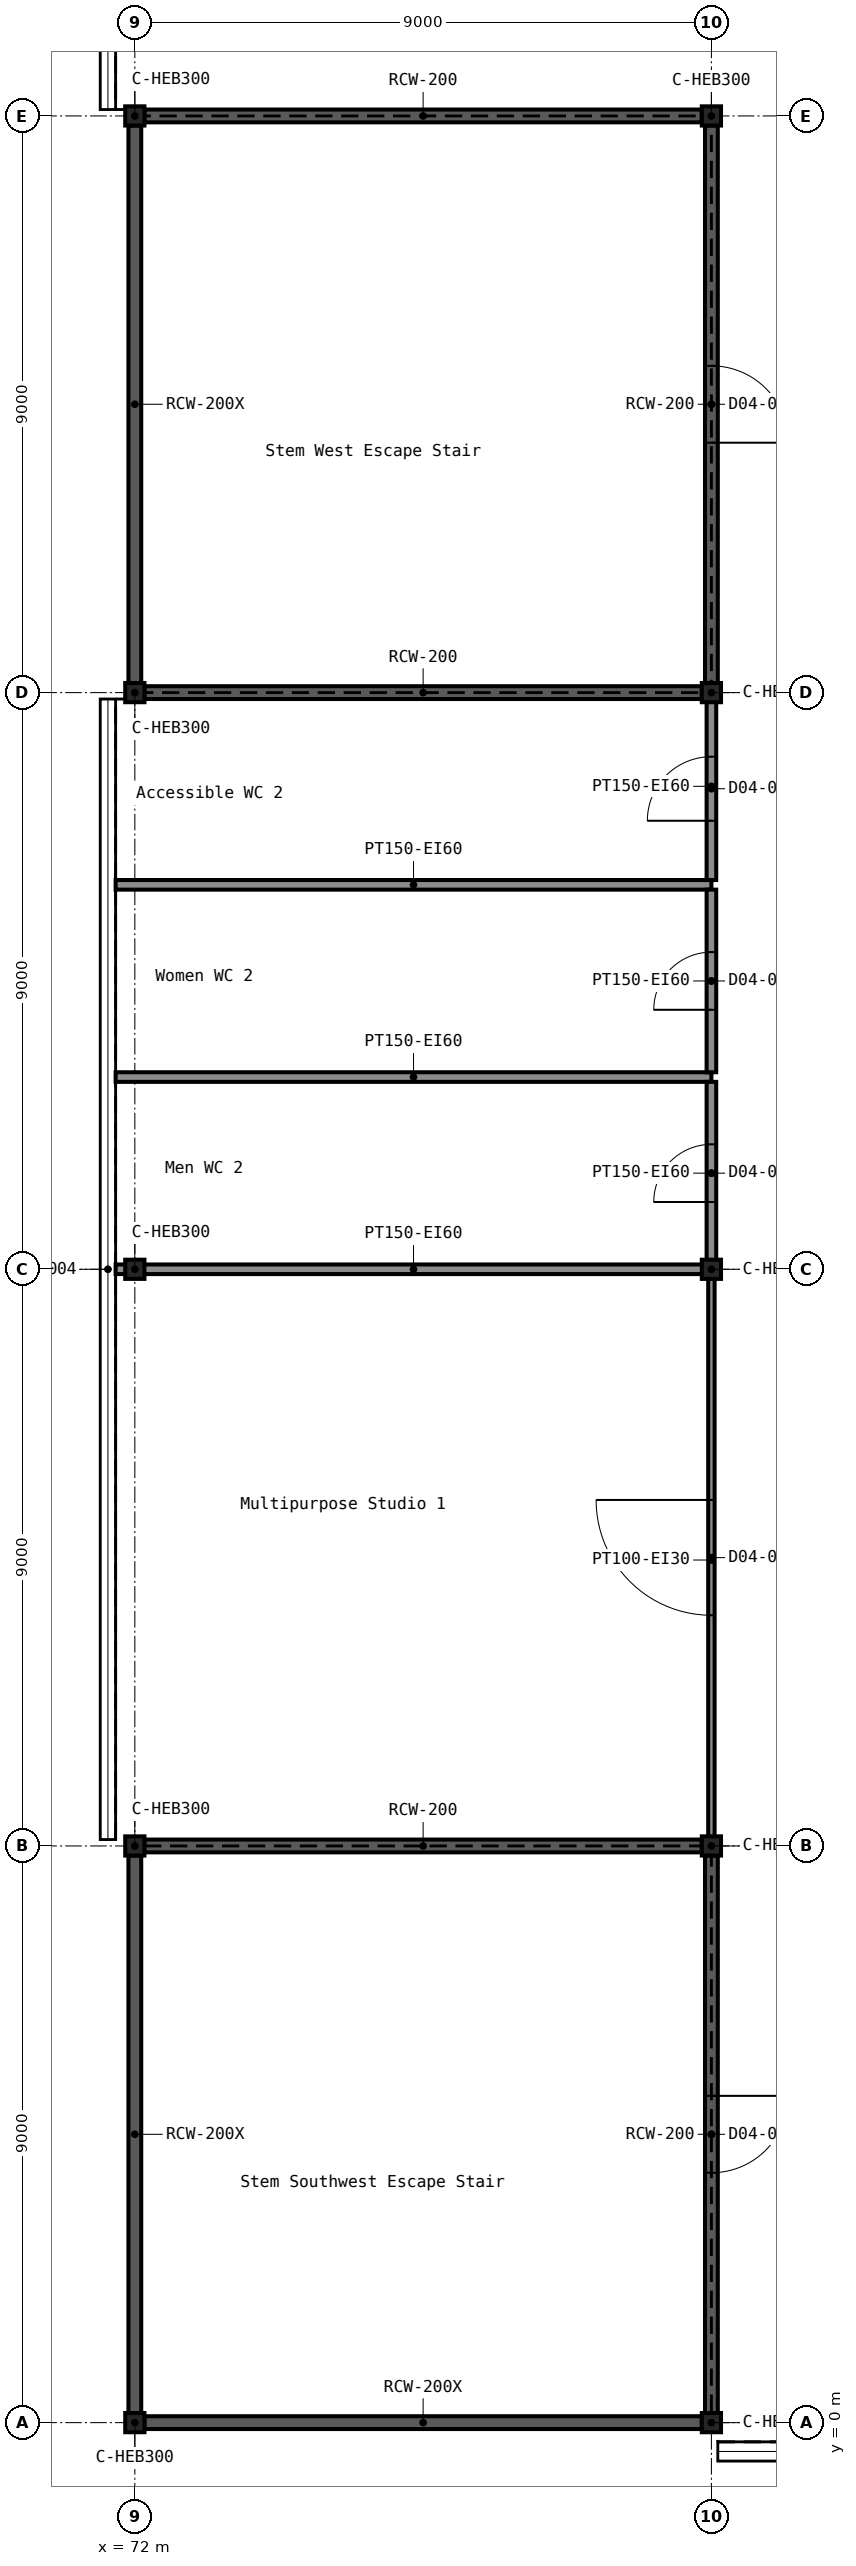
"""IFC4 building model, lengths in metres.
Left out: names, types, materials, properties, quantities, classifications, styles, units other than length and angle.
Written with IfcOpenShell. Run it as: python <this file> out.ifc"""

import sys

from ifc_helpers import new_model, si_unit, direction, frame, frame_2d, origin, origin_2d, place, context, subcontext, project, spatial, rectangle, i_section, extrude, element, fill, save


model = new_model("IFC4")
c1 = context("Model", 3, precision=1e-05, world=origin(), true_north=direction((0.0, 1.0)))
c2 = subcontext(c1, "Body", "Model", "MODEL_VIEW")
j1 = project(units=[si_unit("LENGTHUNIT", "METRE"), si_unit("PLANEANGLEUNIT", "RADIAN")], contexts=[c1])
p1 = place(None, origin())
s1 = spatial("IfcSite", under=j1, at=p1, CompositionType="ELEMENT")
p2 = place(p1, origin())
s2 = spatial("IfcBuilding", under=s1, at=p2, CompositionType="ELEMENT")
p3 = place(p2, frame((0.0, 0.0, 21.6)))
s3 = spatial("IfcBuildingStorey", under=s2, at=p3, CompositionType="ELEMENT", Elevation=21.6)
for number, where, z_axis, x_axis in (
    (1, (72.0, 0.0, 0.0), (0.0, 0.0, 1.0), (0.0, 1.0, 0.0)),
    (2, (81.0, 0.0, 0.0), (0.0, 0.0, 1.0), (0.0, 1.0, 0.0)),
    (3, (72.0, 9.0, 0.0), (0.0, 0.0, 1.0), (0.0, 1.0, 0.0)),
    (4, (81.0, 9.0, 0.0), (0.0, 0.0, 1.0), (1.0, 0.0, 0.0)),
    (5, (72.0, 18.0, 0.0), (0.0, 0.0, 1.0), (0.0, 1.0, 0.0)),
    (6, (81.0, 18.0, 0.0), (0.0, 0.0, 1.0), (1.0, 0.0, 0.0)),
    (7, (72.0, 27.0, 0.0), (0.0, 0.0, 1.0), (0.0, 1.0, 0.0)),
    (8, (81.0, 27.0, 0.0), (0.0, 0.0, 1.0), (1.0, 0.0, 0.0)),
    (9, (72.0, 36.0, 0.0), (0.0, 0.0, 1.0), (0.0, 1.0, 0.0)),
    (10, (81.0, 36.0, 0.0), (0.0, 0.0, 1.0), (1.0, 0.0, 0.0)),
):
    element("IfcColumn", number, at=place(p3, frame(where, z_axis=z_axis, x_axis=x_axis)), inside=s3, PredefinedType="COLUMN", context=c2, shape_type="SweptSolid", body=[
        extrude(i_section(OverallWidth=0.3, OverallDepth=0.3, WebThickness=0.011, FlangeThickness=0.019, FilletRadius=0.027, at=origin_2d()), origin(), (0.0, 0.0, 1.0), 5.4),
    ])
for number, where, z_axis, x_axis in (
    (11, (72.15, 0.0, 0.0), (0.0, 0.0, 1.0), (1.0, 0.0, 0.0)),
    (12, (72.15, 9.0, 0.0), (0.0, 0.0, 1.0), (1.0, 0.0, 0.0)),
    (13, (72.0, 0.15, 0.0), (0.0, 0.0, 1.0), (0.0, 1.0, 0.0)),
):
    element("IfcWall", number, at=place(p3, frame(where, z_axis=z_axis, x_axis=x_axis)), inside=s3, PredefinedType="SHEAR", context=c2, shape_type="SweptSolid", body=[
        extrude(rectangle(XDim=8.7, YDim=0.2, at=frame_2d((4.35, 0.0))), origin(), (0.0, 0.0, 1.0), 5.4),
    ])
p4 = place(p3, frame((81.0, 0.15, 0.0), z_axis=(0.0, 0.0, 1.0), x_axis=(0.0, 1.0, 0.0)))
e14 = element("IfcWall", 14, at=p4, inside=s3, PredefinedType="SHEAR", context=c2, shape_type="SweptSolid", body=[
    extrude(rectangle(XDim=8.7, YDim=0.2, at=frame_2d((4.35, 0.0))), origin(), (0.0, 0.0, 1.0), 5.4),
])
p5 = place(p4, frame((3.75, 0.0, 0.0)))
e15 = element("IfcOpeningElement", 15, at=p5, cuts=e14, PredefinedType="OPENING", context=c2, shape_type="SweptSolid", body=[
    extrude(rectangle(XDim=1.2, YDim=2.1, at=frame_2d((0.6, 1.05))), frame((0.0, 0.111, 0.0), z_axis=(0.0, -1.0, 0.0), x_axis=(1.0, 0.0, 0.0)), (0.0, 0.0, 1.0), 0.222),
])
for number, where, z_axis, x_axis in (
    (16, (72.15, 27.0, 0.0), (0.0, 0.0, 1.0), (1.0, 0.0, 0.0)),
    (17, (72.15, 36.0, 0.0), (0.0, 0.0, 1.0), (1.0, 0.0, 0.0)),
    (18, (72.0, 27.15, 0.0), (0.0, 0.0, 1.0), (0.0, 1.0, 0.0)),
):
    element("IfcWall", number, at=place(p3, frame(where, z_axis=z_axis, x_axis=x_axis)), inside=s3, PredefinedType="SHEAR", context=c2, shape_type="SweptSolid", body=[
        extrude(rectangle(XDim=8.7, YDim=0.2, at=frame_2d((4.35, 0.0))), origin(), (0.0, 0.0, 1.0), 5.4),
    ])
p6 = place(p3, frame((81.0, 27.15, 0.0), z_axis=(0.0, 0.0, 1.0), x_axis=(0.0, 1.0, 0.0)))
e19 = element("IfcWall", 19, at=p6, inside=s3, PredefinedType="SHEAR", context=c2, shape_type="SweptSolid", body=[
    extrude(rectangle(XDim=8.7, YDim=0.2, at=frame_2d((4.35, 0.0))), origin(), (0.0, 0.0, 1.0), 5.4),
])
p7 = place(p6, frame((3.75, 0.0, 0.0)))
e20 = element("IfcOpeningElement", 20, at=p7, cuts=e19, PredefinedType="OPENING", context=c2, shape_type="SweptSolid", body=[
    extrude(rectangle(XDim=1.2, YDim=2.1, at=frame_2d((0.6, 1.05))), frame((0.0, 0.111, 0.0), z_axis=(0.0, -1.0, 0.0), x_axis=(1.0, 0.0, 0.0)), (0.0, 0.0, 1.0), 0.222),
])
for number, where, z_axis, x_axis in (
    (21, (71.7, 18.0, 0.0), (0.0, 0.0, 1.0), (1.0, 0.0, 0.0)),
    (22, (71.7, 21.0, 0.0), (0.0, 0.0, 1.0), (1.0, 0.0, 0.0)),
    (23, (71.7, 24.0, 0.0), (0.0, 0.0, 1.0), (1.0, 0.0, 0.0)),
):
    element("IfcWall", number, at=place(p3, frame(where, z_axis=z_axis, x_axis=x_axis)), inside=s3, PredefinedType="PARTITIONING", context=c2, shape_type="SweptSolid", body=[
        extrude(rectangle(XDim=9.3, YDim=0.15, at=frame_2d((4.65, 0.0))), origin(), (0.0, 0.0, 1.0), 5.4),
    ])
p8 = place(p3, frame((81.0, 18.075, 0.0), z_axis=(0.0, 0.0, 1.0), x_axis=(0.0, 1.0, 0.0)))
e24 = element("IfcWall", 24, at=p8, inside=s3, PredefinedType="PARTITIONING", context=c2, shape_type="SweptSolid", body=[
    extrude(rectangle(XDim=2.85, YDim=0.15, at=frame_2d((1.425, 0.0))), origin(), (0.0, 0.0, 1.0), 5.4),
])
p9 = place(p8, frame((0.975, 0.0, 0.0)))
e25 = element("IfcOpeningElement", 25, at=p9, cuts=e24, PredefinedType="OPENING", context=c2, shape_type="SweptSolid", body=[
    extrude(rectangle(XDim=0.9, YDim=2.1, at=frame_2d((0.45, 1.05))), frame((0.0, 0.086, 0.0), z_axis=(0.0, -1.0, 0.0), x_axis=(1.0, 0.0, 0.0)), (0.0, 0.0, 1.0), 0.172),
])
p10 = place(p3, frame((81.0, 21.075, 0.0), z_axis=(0.0, 0.0, 1.0), x_axis=(0.0, 1.0, 0.0)))
e26 = element("IfcWall", 26, at=p10, inside=s3, PredefinedType="PARTITIONING", context=c2, shape_type="SweptSolid", body=[
    extrude(rectangle(XDim=2.85, YDim=0.15, at=frame_2d((1.425, 0.0))), origin(), (0.0, 0.0, 1.0), 5.4),
])
p11 = place(p10, frame((0.975, 0.0, 0.0)))
e27 = element("IfcOpeningElement", 27, at=p11, cuts=e26, PredefinedType="OPENING", context=c2, shape_type="SweptSolid", body=[
    extrude(rectangle(XDim=0.9, YDim=2.1, at=frame_2d((0.45, 1.05))), frame((0.0, 0.086, 0.0), z_axis=(0.0, -1.0, 0.0), x_axis=(1.0, 0.0, 0.0)), (0.0, 0.0, 1.0), 0.172),
])
p12 = place(p3, frame((81.0, 24.075, 0.0), z_axis=(0.0, 0.0, 1.0), x_axis=(0.0, 1.0, 0.0)))
e28 = element("IfcWall", 28, at=p12, inside=s3, PredefinedType="PARTITIONING", context=c2, shape_type="SweptSolid", body=[
    extrude(rectangle(XDim=2.925, YDim=0.15, at=frame_2d((1.462, 0.0))), origin(), (0.0, 0.0, 1.0), 5.4),
])
p13 = place(p12, frame((0.925, 0.0, 0.0)))
e29 = element("IfcOpeningElement", 29, at=p13, cuts=e28, PredefinedType="OPENING", context=c2, shape_type="SweptSolid", body=[
    extrude(rectangle(XDim=1.0, YDim=2.1, at=frame_2d((0.5, 1.05))), frame((0.0, 0.086, 0.0), z_axis=(0.0, -1.0, 0.0), x_axis=(1.0, 0.0, 0.0)), (0.0, 0.0, 1.0), 0.172),
])
p14 = place(p3, frame((81.0, 9.0, 0.0), z_axis=(0.0, 0.0, 1.0), x_axis=(0.0, 1.0, 0.0)))
e30 = element("IfcWall", 30, at=p14, inside=s3, PredefinedType="PARTITIONING", context=c2, shape_type="SweptSolid", body=[
    extrude(rectangle(XDim=8.925, YDim=0.1, at=frame_2d((4.462, 0.0))), origin(), (0.0, 0.0, 1.0), 5.4),
])
p15 = place(p14, frame((3.6, 0.0, 0.0)))
e31 = element("IfcOpeningElement", 31, at=p15, cuts=e30, PredefinedType="OPENING", context=c2, shape_type="SweptSolid", body=[
    extrude(rectangle(XDim=1.8, YDim=2.1, at=frame_2d((0.9, 1.05))), frame((0.0, 0.061, 0.0), z_axis=(0.0, -1.0, 0.0), x_axis=(1.0, 0.0, 0.0)), (0.0, 0.0, 1.0), 0.122),
])
p16 = place(p5, frame((1.2, 0.0, 0.0), z_axis=(0.0, 0.0, 1.0), x_axis=(-1.0, 0.0, 0.0)))
e32 = element("IfcDoor", 32, at=p16, inside=s3, OperationType="SINGLE_SWING_LEFT", PredefinedType="DOOR", context=c2, shape_type="SweptSolid", body=[
    extrude(rectangle(XDim=1.2, YDim=2.1, at=frame_2d((0.6, 1.05))), frame((0.0, 0.025, 0.0), z_axis=(0.0, -1.0, 0.0), x_axis=(1.0, 0.0, 0.0)), (0.0, 0.0, 1.0), 0.05),
])
fill(e15, e32)
p17 = place(p7, frame((1.2, 0.0, 0.0), z_axis=(0.0, 0.0, 1.0), x_axis=(-1.0, 0.0, 0.0)))
e33 = element("IfcDoor", 33, at=p17, inside=s3, OperationType="SINGLE_SWING_RIGHT", PredefinedType="DOOR", context=c2, shape_type="SweptSolid", body=[
    extrude(rectangle(XDim=1.2, YDim=2.1, at=frame_2d((0.6, 1.05))), frame((0.0, 0.025, 0.0), z_axis=(0.0, -1.0, 0.0), x_axis=(1.0, 0.0, 0.0)), (0.0, 0.0, 1.0), 0.05),
])
fill(e20, e33)
p18 = place(p15, origin())
e34 = element("IfcDoor", 34, at=p18, inside=s3, OperationType="DOUBLE_DOOR_SINGLE_SWING", PredefinedType="DOOR", context=c2, shape_type="SweptSolid", body=[
    extrude(rectangle(XDim=1.8, YDim=2.1, at=frame_2d((0.9, 1.05))), frame((0.0, 0.025, 0.0), z_axis=(0.0, -1.0, 0.0), x_axis=(1.0, 0.0, 0.0)), (0.0, 0.0, 1.0), 0.05),
])
fill(e31, e34)
p19 = place(p9, origin())
e35 = element("IfcDoor", 35, at=p19, inside=s3, OperationType="SINGLE_SWING_LEFT", PredefinedType="DOOR", context=c2, shape_type="SweptSolid", body=[
    extrude(rectangle(XDim=0.9, YDim=2.1, at=frame_2d((0.45, 1.05))), frame((0.0, 0.025, 0.0), z_axis=(0.0, -1.0, 0.0), x_axis=(1.0, 0.0, 0.0)), (0.0, 0.0, 1.0), 0.05),
])
fill(e25, e35)
p20 = place(p11, origin())
e36 = element("IfcDoor", 36, at=p20, inside=s3, OperationType="SINGLE_SWING_LEFT", PredefinedType="DOOR", context=c2, shape_type="SweptSolid", body=[
    extrude(rectangle(XDim=0.9, YDim=2.1, at=frame_2d((0.45, 1.05))), frame((0.0, 0.025, 0.0), z_axis=(0.0, -1.0, 0.0), x_axis=(1.0, 0.0, 0.0)), (0.0, 0.0, 1.0), 0.05),
])
fill(e27, e36)
p21 = place(p13, origin())
e37 = element("IfcDoor", 37, at=p21, inside=s3, OperationType="SINGLE_SWING_LEFT", PredefinedType="DOOR", context=c2, shape_type="SweptSolid", body=[
    extrude(rectangle(XDim=1.0, YDim=2.1, at=frame_2d((0.5, 1.05))), frame((0.0, 0.025, 0.0), z_axis=(0.0, -1.0, 0.0), x_axis=(1.0, 0.0, 0.0)), (0.0, 0.0, 1.0), 0.05),
])
fill(e29, e37)
save(model, sys.argv[1])
